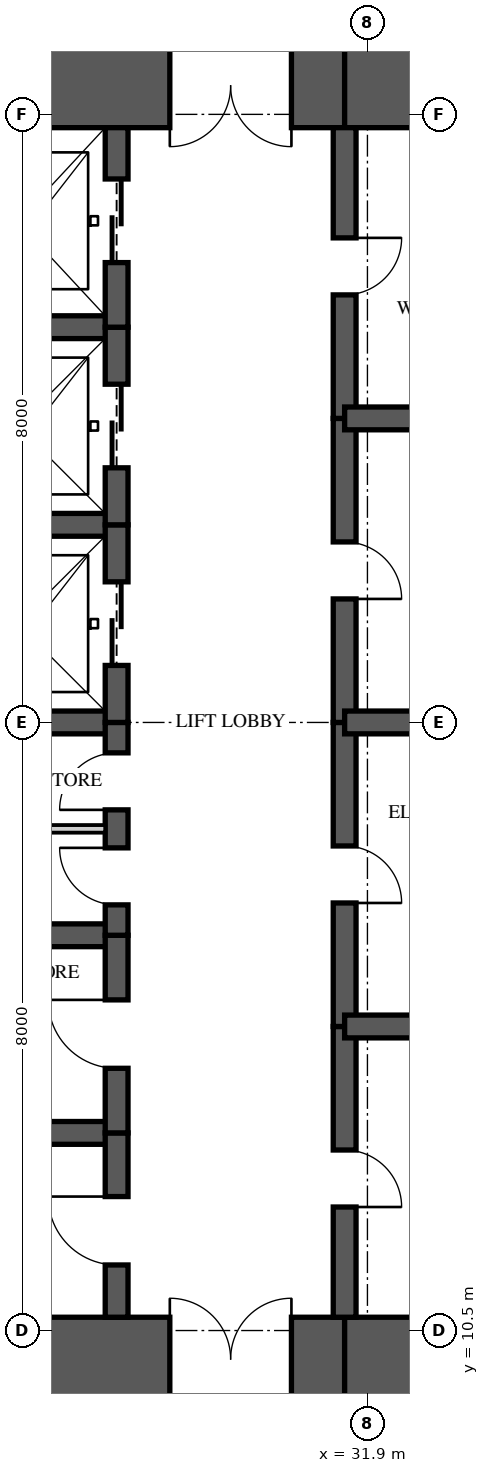
"""IFC4 building model, lengths in metres.
Left out: names, types, materials, properties, quantities, classifications, styles, units other than length and angle.
Written with IfcOpenShell. Run it as: python <this file> out.ifc"""

import sys

from ifc_helpers import new_model, si_unit, direction, frame, frame_2d, origin, place, context, subcontext, project, spatial, rectangle, extrude, element, fill, save


model = new_model("IFC4")
c1 = context("Model", 3, precision=1e-05, world=origin(), true_north=direction((0.0, 1.0)))
c2 = subcontext(c1, "Body", "Model", "MODEL_VIEW")
j1 = project(units=[si_unit("LENGTHUNIT", "METRE"), si_unit("PLANEANGLEUNIT", "RADIAN")], contexts=[c1])
p1 = place(None, origin())
s1 = spatial("IfcSite", under=j1, at=p1, CompositionType="ELEMENT")
p2 = place(p1, origin())
s2 = spatial("IfcBuilding", under=s1, at=p2, CompositionType="ELEMENT")
p3 = place(p2, frame((0.0, 0.0, 228.45)))
s3 = spatial("IfcBuildingStorey", under=s2, at=p3, CompositionType="ELEMENT", Elevation=228.45)
p4 = place(p3, frame((26.0, 10.125, 0.0), z_axis=(0.0, 0.0, 1.0), x_axis=(1.0, 0.0, 0.0)))
e1 = element("IfcWall", 1, at=p4, inside=s3, PredefinedType="SHEAR", context=c2, shape_type="SweptSolid", body=[
    extrude(rectangle(XDim=5.6, YDim=1.1, at=frame_2d((2.8, 0.0))), origin(), (0.0, 0.0, 1.0), 3.5),
])
p5 = place(p4, frame((3.3, 0.0, 0.0)))
e2 = element("IfcOpeningElement", 2, at=p5, cuts=e1, PredefinedType="OPENING", context=c2, shape_type="SweptSolid", body=[
    extrude(rectangle(XDim=1.6, YDim=2.1, at=frame_2d((0.8, 1.05))), frame((0.0, 0.56, 0.0), z_axis=(0.0, -1.0, 0.0), x_axis=(1.0, 0.0, 0.0)), (0.0, 0.0, 1.0), 1.12),
])
for number, where, z_axis, x_axis in (
    (3, (31.6, 10.125, 0.0), (0.0, 0.0, 1.0), (1.0, 0.0, 0.0)),
    (4, (35.9, 26.875, 0.0), (0.0, 0.0, 1.0), (-1.0, 0.0, 0.0)),
):
    element("IfcWall", number, at=place(p3, frame(where, z_axis=z_axis, x_axis=x_axis)), inside=s3, PredefinedType="SHEAR", context=c2, shape_type="SweptSolid", body=[
        extrude(rectangle(XDim=4.3, YDim=1.1, at=frame_2d((2.15, 0.0))), origin(), (0.0, 0.0, 1.0), 3.5),
    ])
p6 = place(p3, frame((31.6, 26.875, 0.0), z_axis=(0.0, 0.0, 1.0), x_axis=(-1.0, 0.0, 0.0)))
e5 = element("IfcWall", 5, at=p6, inside=s3, PredefinedType="SHEAR", context=c2, shape_type="SweptSolid", body=[
    extrude(rectangle(XDim=5.6, YDim=1.1, at=frame_2d((2.8, 0.0))), origin(), (0.0, 0.0, 1.0), 3.5),
])
p7 = place(p6, frame((0.7, 0.0, 0.0)))
e6 = element("IfcOpeningElement", 6, at=p7, cuts=e5, PredefinedType="OPENING", context=c2, shape_type="SweptSolid", body=[
    extrude(rectangle(XDim=1.6, YDim=2.1, at=frame_2d((0.8, 1.05))), frame((0.0, 0.56, 0.0), z_axis=(0.0, -1.0, 0.0), x_axis=(1.0, 0.0, 0.0)), (0.0, 0.0, 1.0), 1.12),
])
p8 = place(p3, frame((28.6, 10.675, 0.0), z_axis=(0.0, 0.0, 1.0), x_axis=(0.0, 1.0, 0.0)))
e7 = element("IfcWall", 7, at=p8, inside=s3, PredefinedType="SHEAR", context=c2, shape_type="SweptSolid", body=[
    extrude(rectangle(XDim=2.425, YDim=0.3, at=frame_2d((1.212, 0.0))), origin(), (0.0, 0.0, 1.0), 3.5),
])
p9 = place(p8, frame((0.688, 0.0, 0.0)))
e8 = element("IfcOpeningElement", 8, at=p9, cuts=e7, PredefinedType="OPENING", context=c2, shape_type="SweptSolid", body=[
    extrude(rectangle(XDim=0.9, YDim=2.1, at=frame_2d((0.45, 1.05))), frame((0.0, 0.16, 0.0), z_axis=(0.0, -1.0, 0.0), x_axis=(1.0, 0.0, 0.0)), (0.0, 0.0, 1.0), 0.32),
])
p10 = place(p3, frame((28.6, 13.1, 0.0), z_axis=(0.0, 0.0, 1.0), x_axis=(0.0, 1.0, 0.0)))
e9 = element("IfcWall", 9, at=p10, inside=s3, PredefinedType="SHEAR", context=c2, shape_type="SweptSolid", body=[
    extrude(rectangle(XDim=2.6, YDim=0.3, at=frame_2d((1.3, 0.0))), origin(), (0.0, 0.0, 1.0), 3.5),
])
p11 = place(p10, frame((0.85, 0.0, 0.0)))
e10 = element("IfcOpeningElement", 10, at=p11, cuts=e9, PredefinedType="OPENING", context=c2, shape_type="SweptSolid", body=[
    extrude(rectangle(XDim=0.9, YDim=2.1, at=frame_2d((0.45, 1.05))), frame((0.0, 0.16, 0.0), z_axis=(0.0, -1.0, 0.0), x_axis=(1.0, 0.0, 0.0)), (0.0, 0.0, 1.0), 0.32),
])
p12 = place(p3, frame((28.6, 15.7, 0.0), z_axis=(0.0, 0.0, 1.0), x_axis=(0.0, 1.0, 0.0)))
e11 = element("IfcWall", 11, at=p12, inside=s3, PredefinedType="SHEAR", context=c2, shape_type="SweptSolid", body=[
    extrude(rectangle(XDim=2.8, YDim=0.3, at=frame_2d((1.4, 0.0))), origin(), (0.0, 0.0, 1.0), 3.5),
])
p13 = place(p12, frame((0.4, 0.0, 0.0)))
e12 = element("IfcOpeningElement", 12, at=p13, cuts=e11, PredefinedType="OPENING", context=c2, shape_type="SweptSolid", body=[
    extrude(rectangle(XDim=0.75, YDim=2.1, at=frame_2d((0.375, 1.05))), frame((0.0, 0.16, 0.0), z_axis=(0.0, -1.0, 0.0), x_axis=(1.0, 0.0, 0.0)), (0.0, 0.0, 1.0), 0.32),
])
p14 = place(p12, frame((1.65, 0.0, 0.0)))
e13 = element("IfcOpeningElement", 13, at=p14, cuts=e11, PredefinedType="OPENING", context=c2, shape_type="SweptSolid", body=[
    extrude(rectangle(XDim=0.75, YDim=2.1, at=frame_2d((0.375, 1.05))), frame((0.0, 0.16, 0.0), z_axis=(0.0, -1.0, 0.0), x_axis=(1.0, 0.0, 0.0)), (0.0, 0.0, 1.0), 0.32),
])
p15 = place(p3, frame((28.6, 18.5, 0.0), z_axis=(0.0, 0.0, 1.0), x_axis=(0.0, 1.0, 0.0)))
e14 = element("IfcWall", 14, at=p15, inside=s3, PredefinedType="SHEAR", context=c2, shape_type="SweptSolid", body=[
    extrude(rectangle(XDim=2.6, YDim=0.3, at=frame_2d((1.3, 0.0))), origin(), (0.0, 0.0, 1.0), 3.5),
])
p16 = place(p15, frame((0.75, 0.0, 0.0)))
e15 = element("IfcOpeningElement", 15, at=p16, cuts=e14, PredefinedType="OPENING", context=c2, shape_type="SweptSolid", body=[
    extrude(rectangle(XDim=1.1, YDim=2.1, at=frame_2d((0.55, 1.05))), frame((0.0, 0.16, 0.0), z_axis=(0.0, -1.0, 0.0), x_axis=(1.0, 0.0, 0.0)), (0.0, 0.0, 1.0), 0.32),
])
p17 = place(p3, frame((28.6, 21.1, 0.0), z_axis=(0.0, 0.0, 1.0), x_axis=(0.0, 1.0, 0.0)))
e16 = element("IfcWall", 16, at=p17, inside=s3, PredefinedType="SHEAR", context=c2, shape_type="SweptSolid", body=[
    extrude(rectangle(XDim=2.6, YDim=0.3, at=frame_2d((1.3, 0.0))), origin(), (0.0, 0.0, 1.0), 3.5),
])
p18 = place(p17, frame((0.75, 0.0, 0.0)))
e17 = element("IfcOpeningElement", 17, at=p18, cuts=e16, PredefinedType="OPENING", context=c2, shape_type="SweptSolid", body=[
    extrude(rectangle(XDim=1.1, YDim=2.1, at=frame_2d((0.55, 1.05))), frame((0.0, 0.16, 0.0), z_axis=(0.0, -1.0, 0.0), x_axis=(1.0, 0.0, 0.0)), (0.0, 0.0, 1.0), 0.32),
])
p19 = place(p3, frame((28.6, 23.7, 0.0), z_axis=(0.0, 0.0, 1.0), x_axis=(0.0, 1.0, 0.0)))
e18 = element("IfcWall", 18, at=p19, inside=s3, PredefinedType="SHEAR", context=c2, shape_type="SweptSolid", body=[
    extrude(rectangle(XDim=2.625, YDim=0.3, at=frame_2d((1.312, 0.0))), origin(), (0.0, 0.0, 1.0), 3.5),
])
p20 = place(p19, frame((0.85, 0.0, 0.0)))
e19 = element("IfcOpeningElement", 19, at=p20, cuts=e18, PredefinedType="OPENING", context=c2, shape_type="SweptSolid", body=[
    extrude(rectangle(XDim=1.1, YDim=2.1, at=frame_2d((0.55, 1.05))), frame((0.0, 0.16, 0.0), z_axis=(0.0, -1.0, 0.0), x_axis=(1.0, 0.0, 0.0)), (0.0, 0.0, 1.0), 0.32),
])
p21 = place(p3, frame((31.6, 10.675, 0.0), z_axis=(0.0, 0.0, 1.0), x_axis=(0.0, 1.0, 0.0)))
e20 = element("IfcWall", 20, at=p21, inside=s3, PredefinedType="SHEAR", context=c2, shape_type="SweptSolid", body=[
    extrude(rectangle(XDim=3.825, YDim=0.3, at=frame_2d((1.913, 0.0))), origin(), (0.0, 0.0, 1.0), 3.5),
])
p22 = place(p21, frame((1.45, 0.0, 0.0)))
e21 = element("IfcOpeningElement", 21, at=p22, cuts=e20, PredefinedType="OPENING", context=c2, shape_type="SweptSolid", body=[
    extrude(rectangle(XDim=0.75, YDim=2.1, at=frame_2d((0.375, 1.05))), frame((0.0, 0.16, 0.0), z_axis=(0.0, -1.0, 0.0), x_axis=(1.0, 0.0, 0.0)), (0.0, 0.0, 1.0), 0.32),
])
p23 = place(p3, frame((31.6, 14.5, 0.0), z_axis=(0.0, 0.0, 1.0), x_axis=(0.0, 1.0, 0.0)))
e22 = element("IfcWall", 22, at=p23, inside=s3, PredefinedType="SHEAR", context=c2, shape_type="SweptSolid", body=[
    extrude(rectangle(XDim=4.0, YDim=0.3, at=frame_2d((2.0, 0.0))), origin(), (0.0, 0.0, 1.0), 3.5),
])
p24 = place(p23, frame((1.625, 0.0, 0.0)))
e23 = element("IfcOpeningElement", 23, at=p24, cuts=e22, PredefinedType="OPENING", context=c2, shape_type="SweptSolid", body=[
    extrude(rectangle(XDim=0.75, YDim=2.1, at=frame_2d((0.375, 1.05))), frame((0.0, 0.16, 0.0), z_axis=(0.0, -1.0, 0.0), x_axis=(1.0, 0.0, 0.0)), (0.0, 0.0, 1.0), 0.32),
])
p25 = place(p3, frame((31.6, 18.5, 0.0), z_axis=(0.0, 0.0, 1.0), x_axis=(0.0, 1.0, 0.0)))
e24 = element("IfcWall", 24, at=p25, inside=s3, PredefinedType="SHEAR", context=c2, shape_type="SweptSolid", body=[
    extrude(rectangle(XDim=4.0, YDim=0.3, at=frame_2d((2.0, 0.0))), origin(), (0.0, 0.0, 1.0), 3.5),
])
p26 = place(p25, frame((1.625, 0.0, 0.0)))
e25 = element("IfcOpeningElement", 25, at=p26, cuts=e24, PredefinedType="OPENING", context=c2, shape_type="SweptSolid", body=[
    extrude(rectangle(XDim=0.75, YDim=2.1, at=frame_2d((0.375, 1.05))), frame((0.0, 0.16, 0.0), z_axis=(0.0, -1.0, 0.0), x_axis=(1.0, 0.0, 0.0)), (0.0, 0.0, 1.0), 0.32),
])
p27 = place(p3, frame((31.6, 22.5, 0.0), z_axis=(0.0, 0.0, 1.0), x_axis=(0.0, 1.0, 0.0)))
e26 = element("IfcWall", 26, at=p27, inside=s3, PredefinedType="SHEAR", context=c2, shape_type="SweptSolid", body=[
    extrude(rectangle(XDim=3.825, YDim=0.3, at=frame_2d((1.913, 0.0))), origin(), (0.0, 0.0, 1.0), 3.5),
])
p28 = place(p27, frame((1.625, 0.0, 0.0)))
e27 = element("IfcOpeningElement", 27, at=p28, cuts=e26, PredefinedType="OPENING", context=c2, shape_type="SweptSolid", body=[
    extrude(rectangle(XDim=0.75, YDim=2.1, at=frame_2d((0.375, 1.05))), frame((0.0, 0.16, 0.0), z_axis=(0.0, -1.0, 0.0), x_axis=(1.0, 0.0, 0.0)), (0.0, 0.0, 1.0), 0.32),
])
for number, where, z_axis, x_axis in (
    (28, (26.0, 13.1, 0.0), (0.0, 0.0, 1.0), (1.0, 0.0, 0.0)),
    (29, (26.0, 15.7, 0.0), (0.0, 0.0, 1.0), (1.0, 0.0, 0.0)),
    (30, (26.0, 18.5, 0.0), (0.0, 0.0, 1.0), (1.0, 0.0, 0.0)),
    (31, (26.0, 21.1, 0.0), (0.0, 0.0, 1.0), (1.0, 0.0, 0.0)),
    (32, (26.0, 23.7, 0.0), (0.0, 0.0, 1.0), (1.0, 0.0, 0.0)),
):
    element("IfcWall", number, at=place(p3, frame(where, z_axis=z_axis, x_axis=x_axis)), inside=s3, PredefinedType="SHEAR", context=c2, shape_type="SweptSolid", body=[
        extrude(rectangle(XDim=2.6, YDim=0.3, at=frame_2d((1.3, 0.0))), origin(), (0.0, 0.0, 1.0), 3.5),
    ])
for number, where, z_axis, x_axis in (
    (33, (31.6, 14.5, 0.0), (0.0, 0.0, 1.0), (1.0, 0.0, 0.0)),
    (34, (31.6, 18.5, 0.0), (0.0, 0.0, 1.0), (1.0, 0.0, 0.0)),
    (35, (31.6, 22.5, 0.0), (0.0, 0.0, 1.0), (1.0, 0.0, 0.0)),
):
    element("IfcWall", number, at=place(p3, frame(where, z_axis=z_axis, x_axis=x_axis)), inside=s3, PredefinedType="SHEAR", context=c2, shape_type="SweptSolid", body=[
        extrude(rectangle(XDim=4.3, YDim=0.3, at=frame_2d((2.15, 0.0))), origin(), (0.0, 0.0, 1.0), 3.5),
    ])
p29 = place(p3, frame((26.15, 17.1, 0.0), z_axis=(0.0, 0.0, 1.0), x_axis=(1.0, 0.0, 0.0)))
e36 = element("IfcWall", 36, at=p29, inside=s3, PredefinedType="PARTITIONING", context=c2, shape_type="SweptSolid", body=[
    extrude(rectangle(XDim=2.3, YDim=0.1, at=frame_2d((1.15, 0.0))), origin(), (0.0, 0.0, 1.0), 3.26),
])
p30 = place(p16, origin())
e37 = element("IfcDoor", 37, at=p30, inside=s3, OperationType="SLIDING_TO_LEFT", PredefinedType="DOOR", context=c2, shape_type="SweptSolid", body=[
    extrude(rectangle(XDim=1.1, YDim=2.1, at=frame_2d((0.55, 1.05))), frame((0.0, 0.025, 0.0), z_axis=(0.0, -1.0, 0.0), x_axis=(1.0, 0.0, 0.0)), (0.0, 0.0, 1.0), 0.05),
])
fill(e15, e37)
p31 = place(p18, origin())
e38 = element("IfcDoor", 38, at=p31, inside=s3, OperationType="SLIDING_TO_LEFT", PredefinedType="DOOR", context=c2, shape_type="SweptSolid", body=[
    extrude(rectangle(XDim=1.1, YDim=2.1, at=frame_2d((0.55, 1.05))), frame((0.0, 0.025, 0.0), z_axis=(0.0, -1.0, 0.0), x_axis=(1.0, 0.0, 0.0)), (0.0, 0.0, 1.0), 0.05),
])
fill(e17, e38)
p32 = place(p20, origin())
e39 = element("IfcDoor", 39, at=p32, inside=s3, OperationType="SLIDING_TO_LEFT", PredefinedType="DOOR", context=c2, shape_type="SweptSolid", body=[
    extrude(rectangle(XDim=1.1, YDim=2.1, at=frame_2d((0.55, 1.05))), frame((0.0, 0.025, 0.0), z_axis=(0.0, -1.0, 0.0), x_axis=(1.0, 0.0, 0.0)), (0.0, 0.0, 1.0), 0.05),
])
fill(e19, e39)
p33 = place(p9, origin())
e40 = element("IfcDoor", 40, at=p33, inside=s3, OperationType="SINGLE_SWING_RIGHT", PredefinedType="DOOR", context=c2, shape_type="SweptSolid", body=[
    extrude(rectangle(XDim=0.9, YDim=2.1, at=frame_2d((0.45, 1.05))), frame((0.0, 0.025, 0.0), z_axis=(0.0, -1.0, 0.0), x_axis=(1.0, 0.0, 0.0)), (0.0, 0.0, 1.0), 0.05),
])
fill(e8, e40)
p34 = place(p11, origin())
e41 = element("IfcDoor", 41, at=p34, inside=s3, OperationType="SINGLE_SWING_RIGHT", PredefinedType="DOOR", context=c2, shape_type="SweptSolid", body=[
    extrude(rectangle(XDim=0.9, YDim=2.1, at=frame_2d((0.45, 1.05))), frame((0.0, 0.025, 0.0), z_axis=(0.0, -1.0, 0.0), x_axis=(1.0, 0.0, 0.0)), (0.0, 0.0, 1.0), 0.05),
])
fill(e10, e41)
p35 = place(p13, origin())
e42 = element("IfcDoor", 42, at=p35, inside=s3, OperationType="SINGLE_SWING_RIGHT", PredefinedType="DOOR", context=c2, shape_type="SweptSolid", body=[
    extrude(rectangle(XDim=0.75, YDim=2.1, at=frame_2d((0.375, 1.05))), frame((0.0, 0.025, 0.0), z_axis=(0.0, -1.0, 0.0), x_axis=(1.0, 0.0, 0.0)), (0.0, 0.0, 1.0), 0.05),
])
fill(e12, e42)
p36 = place(p14, origin())
e43 = element("IfcDoor", 43, at=p36, inside=s3, OperationType="SINGLE_SWING_LEFT", PredefinedType="DOOR", context=c2, shape_type="SweptSolid", body=[
    extrude(rectangle(XDim=0.75, YDim=2.1, at=frame_2d((0.375, 1.05))), frame((0.0, 0.025, 0.0), z_axis=(0.0, -1.0, 0.0), x_axis=(1.0, 0.0, 0.0)), (0.0, 0.0, 1.0), 0.05),
])
fill(e13, e43)
p37 = place(p5, origin())
e44 = element("IfcDoor", 44, at=p37, inside=s3, OperationType="DOUBLE_DOOR_SINGLE_SWING", PredefinedType="DOOR", context=c2, shape_type="SweptSolid", body=[
    extrude(rectangle(XDim=1.6, YDim=2.1, at=frame_2d((0.8, 1.05))), frame((0.0, 0.025, 0.0), z_axis=(0.0, -1.0, 0.0), x_axis=(1.0, 0.0, 0.0)), (0.0, 0.0, 1.0), 0.05),
])
fill(e2, e44)
p38 = place(p7, origin())
e45 = element("IfcDoor", 45, at=p38, inside=s3, OperationType="DOUBLE_DOOR_SINGLE_SWING", PredefinedType="DOOR", context=c2, shape_type="SweptSolid", body=[
    extrude(rectangle(XDim=1.6, YDim=2.1, at=frame_2d((0.8, 1.05))), frame((0.0, 0.025, 0.0), z_axis=(0.0, -1.0, 0.0), x_axis=(1.0, 0.0, 0.0)), (0.0, 0.0, 1.0), 0.05),
])
fill(e6, e45)
p39 = place(p22, frame((0.75, 0.0, 0.0), z_axis=(0.0, 0.0, 1.0), x_axis=(-1.0, 0.0, 0.0)))
e46 = element("IfcDoor", 46, at=p39, inside=s3, OperationType="SINGLE_SWING_RIGHT", PredefinedType="DOOR", context=c2, shape_type="SweptSolid", body=[
    extrude(rectangle(XDim=0.75, YDim=2.1, at=frame_2d((0.375, 1.05))), frame((0.0, 0.025, 0.0), z_axis=(0.0, -1.0, 0.0), x_axis=(1.0, 0.0, 0.0)), (0.0, 0.0, 1.0), 0.05),
])
fill(e21, e46)
p40 = place(p24, frame((0.75, 0.0, 0.0), z_axis=(0.0, 0.0, 1.0), x_axis=(-1.0, 0.0, 0.0)))
e47 = element("IfcDoor", 47, at=p40, inside=s3, OperationType="SINGLE_SWING_RIGHT", PredefinedType="DOOR", context=c2, shape_type="SweptSolid", body=[
    extrude(rectangle(XDim=0.75, YDim=2.1, at=frame_2d((0.375, 1.05))), frame((0.0, 0.025, 0.0), z_axis=(0.0, -1.0, 0.0), x_axis=(1.0, 0.0, 0.0)), (0.0, 0.0, 1.0), 0.05),
])
fill(e23, e47)
p41 = place(p26, frame((0.75, 0.0, 0.0), z_axis=(0.0, 0.0, 1.0), x_axis=(-1.0, 0.0, 0.0)))
e48 = element("IfcDoor", 48, at=p41, inside=s3, OperationType="SINGLE_SWING_RIGHT", PredefinedType="DOOR", context=c2, shape_type="SweptSolid", body=[
    extrude(rectangle(XDim=0.75, YDim=2.1, at=frame_2d((0.375, 1.05))), frame((0.0, 0.025, 0.0), z_axis=(0.0, -1.0, 0.0), x_axis=(1.0, 0.0, 0.0)), (0.0, 0.0, 1.0), 0.05),
])
fill(e25, e48)
p42 = place(p28, frame((0.75, 0.0, 0.0), z_axis=(0.0, 0.0, 1.0), x_axis=(-1.0, 0.0, 0.0)))
e49 = element("IfcDoor", 49, at=p42, inside=s3, OperationType="SINGLE_SWING_LEFT", PredefinedType="DOOR", context=c2, shape_type="SweptSolid", body=[
    extrude(rectangle(XDim=0.75, YDim=2.1, at=frame_2d((0.375, 1.05))), frame((0.0, 0.025, 0.0), z_axis=(0.0, -1.0, 0.0), x_axis=(1.0, 0.0, 0.0)), (0.0, 0.0, 1.0), 0.05),
])
fill(e27, e49)
save(model, sys.argv[1])
